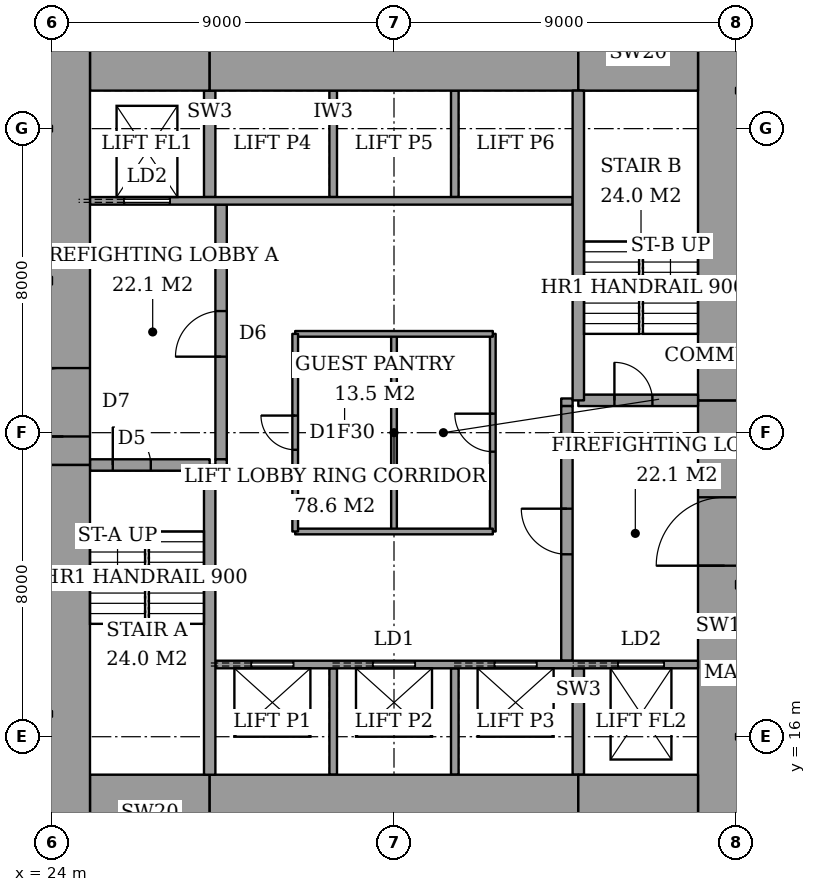
"""IFC4 building model, lengths in metres.
Left out: names, types, materials, properties, quantities, classifications, styles, units other than length and angle.
Written with IfcOpenShell. Run it as: python <this file> out.ifc"""

import sys

from ifc_helpers import new_model, si_unit, direction, frame, frame_2d, origin, place, context, subcontext, project, spatial, rectangle, extrude, element, fill, save


model = new_model("IFC4")
c1 = context("Model", 3, precision=1e-05, world=origin(), true_north=direction((0.0, 1.0)))
c2 = subcontext(c1, "Body", "Model", "MODEL_VIEW")
j1 = project(units=[si_unit("LENGTHUNIT", "METRE"), si_unit("PLANEANGLEUNIT", "RADIAN")], contexts=[c1])
p1 = place(None, origin())
s1 = spatial("IfcSite", under=j1, at=p1, CompositionType="ELEMENT")
p2 = place(p1, origin())
s2 = spatial("IfcBuilding", under=s1, at=p2, CompositionType="ELEMENT")
p3 = place(p2, frame((0.0, 0.0, 83.6)))
s3 = spatial("IfcBuildingStorey", under=s2, at=p3, CompositionType="ELEMENT", Elevation=83.6)
p4 = place(p3, frame((25.0, 14.0, 0.0), z_axis=(0.0, 0.0, 1.0), x_axis=(1.0, 0.0, 0.0)))
e1 = element("IfcWall", 1, at=p4, inside=s3, PredefinedType="SHEAR", context=c2, shape_type="SweptSolid", body=[
    extrude(rectangle(XDim=3.15, YDim=2.0, at=frame_2d((1.575, 0.0))), origin(), (0.0, 0.0, 1.0), 3.6),
])
p5 = place(p3, frame((28.15, 14.0, 0.0), z_axis=(0.0, 0.0, 1.0), x_axis=(1.0, 0.0, 0.0)))
e2 = element("IfcWall", 2, at=p5, inside=s3, PredefinedType="SHEAR", context=c2, shape_type="SweptSolid", body=[
    extrude(rectangle(XDim=9.7, YDim=2.0, at=frame_2d((4.85, 0.0))), origin(), (0.0, 0.0, 1.0), 3.6),
])
for number, where, z_axis, x_axis in (
    (3, (37.85, 14.0, 0.0), (0.0, 0.0, 1.0), (1.0, 0.0, 0.0)),
    (4, (25.0, 34.0, 0.0), (0.0, 0.0, 1.0), (1.0, 0.0, 0.0)),
):
    element("IfcWall", number, at=place(p3, frame(where, z_axis=z_axis, x_axis=x_axis)), inside=s3, PredefinedType="SHEAR", context=c2, shape_type="SweptSolid", body=[
        extrude(rectangle(XDim=3.15, YDim=2.0, at=frame_2d((1.575, 0.0))), origin(), (0.0, 0.0, 1.0), 3.6),
    ])
p6 = place(p3, frame((28.15, 34.0, 0.0), z_axis=(0.0, 0.0, 1.0), x_axis=(1.0, 0.0, 0.0)))
e5 = element("IfcWall", 5, at=p6, inside=s3, PredefinedType="SHEAR", context=c2, shape_type="SweptSolid", body=[
    extrude(rectangle(XDim=9.7, YDim=2.0, at=frame_2d((4.85, 0.0))), origin(), (0.0, 0.0, 1.0), 3.6),
])
p7 = place(p3, frame((37.85, 34.0, 0.0), z_axis=(0.0, 0.0, 1.0), x_axis=(1.0, 0.0, 0.0)))
e6 = element("IfcWall", 6, at=p7, inside=s3, PredefinedType="SHEAR", context=c2, shape_type="SweptSolid", body=[
    extrude(rectangle(XDim=3.15, YDim=2.0, at=frame_2d((1.575, 0.0))), origin(), (0.0, 0.0, 1.0), 3.6),
])
p8 = place(p3, frame((24.3, 13.0, 0.0), z_axis=(0.0, 0.0, 1.0), x_axis=(0.0, 1.0, 0.0)))
e7 = element("IfcWall", 7, at=p8, inside=s3, PredefinedType="SHEAR", context=c2, shape_type="SweptSolid", body=[
    extrude(rectangle(XDim=10.15, YDim=1.4, at=frame_2d((5.075, 0.0))), origin(), (0.0, 0.0, 1.0), 3.6),
])
p9 = place(p3, frame((24.3, 23.15, 0.0), z_axis=(0.0, 0.0, 1.0), x_axis=(0.0, 1.0, 0.0)))
e8 = element("IfcWall", 8, at=p9, inside=s3, PredefinedType="SHEAR", context=c2, shape_type="SweptSolid", body=[
    extrude(rectangle(XDim=11.85, YDim=1.4, at=frame_2d((5.925, 0.0))), origin(), (0.0, 0.0, 1.0), 3.6),
])
p10 = place(p9, frame((0.75, 0.0, 0.0)))
e9 = element("IfcOpeningElement", 9, at=p10, cuts=e8, PredefinedType="OPENING", context=c2, shape_type="SweptSolid", body=[
    extrude(rectangle(XDim=1.8, YDim=2.4, at=frame_2d((0.9, 1.2))), frame((0.0, 0.71, 0.0), z_axis=(0.0, -1.0, 0.0), x_axis=(1.0, 0.0, 0.0)), (0.0, 0.0, 1.0), 1.42),
])
p11 = place(p3, frame((41.7, 13.0, 0.0), z_axis=(0.0, 0.0, 1.0), x_axis=(0.0, 1.0, 0.0)))
e10 = element("IfcWall", 10, at=p11, inside=s3, PredefinedType="SHEAR", context=c2, shape_type="SweptSolid", body=[
    extrude(rectangle(XDim=11.85, YDim=1.4, at=frame_2d((5.925, 0.0))), origin(), (0.0, 0.0, 1.0), 3.6),
])
p12 = place(p11, frame((7.5, 0.0, 0.0)))
e11 = element("IfcOpeningElement", 11, at=p12, cuts=e10, PredefinedType="OPENING", context=c2, shape_type="SweptSolid", body=[
    extrude(rectangle(XDim=1.8, YDim=2.4, at=frame_2d((0.9, 1.2))), frame((0.0, 0.71, 0.0), z_axis=(0.0, -1.0, 0.0), x_axis=(1.0, 0.0, 0.0)), (0.0, 0.0, 1.0), 1.42),
])
p13 = place(p3, frame((41.7, 24.85, 0.0), z_axis=(0.0, 0.0, 1.0), x_axis=(0.0, 1.0, 0.0)))
e12 = element("IfcWall", 12, at=p13, inside=s3, PredefinedType="SHEAR", context=c2, shape_type="SweptSolid", body=[
    extrude(rectangle(XDim=10.15, YDim=1.4, at=frame_2d((5.075, 0.0))), origin(), (0.0, 0.0, 1.0), 3.6),
])
p14 = place(p3, frame((28.15, 15.0, 0.0), z_axis=(0.0, 0.0, 1.0), x_axis=(0.0, 1.0, 0.0)))
e13 = element("IfcWall", 13, at=p14, inside=s3, PredefinedType="SHEAR", context=c2, shape_type="SweptSolid", body=[
    extrude(rectangle(XDim=8.15, YDim=0.3, at=frame_2d((4.075, 0.0))), origin(), (0.0, 0.0, 1.0), 3.6),
])
p15 = place(p3, frame((25.0, 23.15, 0.0), z_axis=(0.0, 0.0, 1.0), x_axis=(1.0, 0.0, 0.0)))
e14 = element("IfcWall", 14, at=p15, inside=s3, PredefinedType="SHEAR", context=c2, shape_type="SweptSolid", body=[
    extrude(rectangle(XDim=3.15, YDim=0.3, at=frame_2d((1.575, 0.0))), origin(), (0.0, 0.0, 1.0), 3.6),
])
p16 = place(p15, frame((0.6, 0.0, 0.0)))
e15 = element("IfcOpeningElement", 15, at=p16, cuts=e14, PredefinedType="OPENING", context=c2, shape_type="SweptSolid", body=[
    extrude(rectangle(XDim=1.0, YDim=2.1, at=frame_2d((0.5, 1.05))), frame((0.0, 0.16, 0.0), z_axis=(0.0, -1.0, 0.0), x_axis=(1.0, 0.0, 0.0)), (0.0, 0.0, 1.0), 0.32),
])
p17 = place(p3, frame((37.85, 24.85, 0.0), z_axis=(0.0, 0.0, 1.0), x_axis=(0.0, 1.0, 0.0)))
e16 = element("IfcWall", 16, at=p17, inside=s3, PredefinedType="SHEAR", context=c2, shape_type="SweptSolid", body=[
    extrude(rectangle(XDim=8.15, YDim=0.3, at=frame_2d((4.075, 0.0))), origin(), (0.0, 0.0, 1.0), 3.6),
])
p18 = place(p3, frame((37.85, 24.85, 0.0), z_axis=(0.0, 0.0, 1.0), x_axis=(1.0, 0.0, 0.0)))
e17 = element("IfcWall", 17, at=p18, inside=s3, PredefinedType="SHEAR", context=c2, shape_type="SweptSolid", body=[
    extrude(rectangle(XDim=3.15, YDim=0.3, at=frame_2d((1.575, 0.0))), origin(), (0.0, 0.0, 1.0), 3.6),
])
p19 = place(p18, frame((0.95, 0.0, 0.0)))
e18 = element("IfcOpeningElement", 18, at=p19, cuts=e17, PredefinedType="OPENING", context=c2, shape_type="SweptSolid", body=[
    extrude(rectangle(XDim=1.0, YDim=2.1, at=frame_2d((0.5, 1.05))), frame((0.0, 0.16, 0.0), z_axis=(0.0, -1.0, 0.0), x_axis=(1.0, 0.0, 0.0)), (0.0, 0.0, 1.0), 0.32),
])
p20 = place(p3, frame((28.45, 23.3, 0.0), z_axis=(0.0, 0.0, 1.0), x_axis=(0.0, 1.0, 0.0)))
e19 = element("IfcWall", 19, at=p20, inside=s3, PredefinedType="PARTITIONING", context=c2, shape_type="SweptSolid", body=[
    extrude(rectangle(XDim=6.7, YDim=0.3, at=frame_2d((3.35, 0.0))), origin(), (0.0, 0.0, 1.0), 3.6),
])
p21 = place(p20, frame((2.7, 0.0, 0.0)))
e20 = element("IfcOpeningElement", 20, at=p21, cuts=e19, PredefinedType="OPENING", context=c2, shape_type="SweptSolid", body=[
    extrude(rectangle(XDim=1.2, YDim=2.1, at=frame_2d((0.6, 1.05))), frame((0.0, 0.16, 0.0), z_axis=(0.0, -1.0, 0.0), x_axis=(1.0, 0.0, 0.0)), (0.0, 0.0, 1.0), 0.32),
])
p22 = place(p3, frame((37.55, 18.0, 0.0), z_axis=(0.0, 0.0, 1.0), x_axis=(0.0, 1.0, 0.0)))
e21 = element("IfcWall", 21, at=p22, inside=s3, PredefinedType="PARTITIONING", context=c2, shape_type="SweptSolid", body=[
    extrude(rectangle(XDim=6.7, YDim=0.3, at=frame_2d((3.35, 0.0))), origin(), (0.0, 0.0, 1.0), 3.6),
])
p23 = place(p22, frame((2.8, 0.0, 0.0)))
e22 = element("IfcOpeningElement", 22, at=p23, cuts=e21, PredefinedType="OPENING", context=c2, shape_type="SweptSolid", body=[
    extrude(rectangle(XDim=1.2, YDim=2.1, at=frame_2d((0.6, 1.05))), frame((0.0, 0.16, 0.0), z_axis=(0.0, -1.0, 0.0), x_axis=(1.0, 0.0, 0.0)), (0.0, 0.0, 1.0), 0.32),
])
p24 = place(p3, frame((28.3, 17.9, 0.0), z_axis=(0.0, 0.0, 1.0), x_axis=(1.0, 0.0, 0.0)))
e23 = element("IfcWall", 23, at=p24, inside=s3, PredefinedType="PARTITIONING", context=c2, shape_type="SweptSolid", body=[
    extrude(rectangle(XDim=12.7, YDim=0.2, at=frame_2d((6.35, 0.0))), origin(), (0.0, 0.0, 1.0), 3.6),
])
p25 = place(p24, frame((0.95, 0.0, 0.0)))
e24 = element("IfcOpeningElement", 24, at=p25, cuts=e23, PredefinedType="OPENING", context=c2, shape_type="SweptSolid", body=[
    extrude(rectangle(XDim=1.1, YDim=2.1, at=frame_2d((0.55, 1.05))), frame((0.0, 0.11, 0.0), z_axis=(0.0, -1.0, 0.0), x_axis=(1.0, 0.0, 0.0)), (0.0, 0.0, 1.0), 0.22),
])
p26 = place(p24, frame((4.15, 0.0, 0.0)))
e25 = element("IfcOpeningElement", 25, at=p26, cuts=e23, PredefinedType="OPENING", context=c2, shape_type="SweptSolid", body=[
    extrude(rectangle(XDim=1.1, YDim=2.1, at=frame_2d((0.55, 1.05))), frame((0.0, 0.11, 0.0), z_axis=(0.0, -1.0, 0.0), x_axis=(1.0, 0.0, 0.0)), (0.0, 0.0, 1.0), 0.22),
])
p27 = place(p24, frame((7.35, 0.0, 0.0)))
e26 = element("IfcOpeningElement", 26, at=p27, cuts=e23, PredefinedType="OPENING", context=c2, shape_type="SweptSolid", body=[
    extrude(rectangle(XDim=1.1, YDim=2.1, at=frame_2d((0.55, 1.05))), frame((0.0, 0.11, 0.0), z_axis=(0.0, -1.0, 0.0), x_axis=(1.0, 0.0, 0.0)), (0.0, 0.0, 1.0), 0.22),
])
p28 = place(p24, frame((10.6, 0.0, 0.0)))
e27 = element("IfcOpeningElement", 27, at=p28, cuts=e23, PredefinedType="OPENING", context=c2, shape_type="SweptSolid", body=[
    extrude(rectangle(XDim=1.2, YDim=2.1, at=frame_2d((0.6, 1.05))), frame((0.0, 0.11, 0.0), z_axis=(0.0, -1.0, 0.0), x_axis=(1.0, 0.0, 0.0)), (0.0, 0.0, 1.0), 0.22),
])
p29 = place(p3, frame((25.0, 30.1, 0.0), z_axis=(0.0, 0.0, 1.0), x_axis=(1.0, 0.0, 0.0)))
e28 = element("IfcWall", 28, at=p29, inside=s3, PredefinedType="PARTITIONING", context=c2, shape_type="SweptSolid", body=[
    extrude(rectangle(XDim=12.7, YDim=0.2, at=frame_2d((6.35, 0.0))), origin(), (0.0, 0.0, 1.0), 3.6),
])
p30 = place(p29, frame((0.9, 0.0, 0.0)))
e29 = element("IfcOpeningElement", 29, at=p30, cuts=e28, PredefinedType="OPENING", context=c2, shape_type="SweptSolid", body=[
    extrude(rectangle(XDim=1.2, YDim=2.1, at=frame_2d((0.6, 1.05))), frame((0.0, 0.11, 0.0), z_axis=(0.0, -1.0, 0.0), x_axis=(1.0, 0.0, 0.0)), (0.0, 0.0, 1.0), 0.22),
])
for number, where, z_axis, x_axis in (
    (30, (31.4, 15.0, 0.0), (0.0, 0.0, 1.0), (0.0, 1.0, 0.0)),
    (31, (34.6, 15.0, 0.0), (0.0, 0.0, 1.0), (0.0, 1.0, 0.0)),
):
    element("IfcWall", number, at=place(p3, frame(where, z_axis=z_axis, x_axis=x_axis)), inside=s3, PredefinedType="PARTITIONING", context=c2, shape_type="SweptSolid", body=[
        extrude(rectangle(XDim=2.8, YDim=0.2, at=frame_2d((1.4, 0.0))), origin(), (0.0, 0.0, 1.0), 3.6),
    ])
p31 = place(p3, frame((37.85, 15.0, 0.0), z_axis=(0.0, 0.0, 1.0), x_axis=(0.0, 1.0, 0.0)))
e32 = element("IfcWall", 32, at=p31, inside=s3, PredefinedType="SHEAR", context=c2, shape_type="SweptSolid", body=[
    extrude(rectangle(XDim=2.8, YDim=0.3, at=frame_2d((1.4, 0.0))), origin(), (0.0, 0.0, 1.0), 3.6),
])
for number, where, z_axis, x_axis in (
    (33, (31.4, 30.2, 0.0), (0.0, 0.0, 1.0), (0.0, 1.0, 0.0)),
    (34, (34.6, 30.2, 0.0), (0.0, 0.0, 1.0), (0.0, 1.0, 0.0)),
):
    element("IfcWall", number, at=place(p3, frame(where, z_axis=z_axis, x_axis=x_axis)), inside=s3, PredefinedType="PARTITIONING", context=c2, shape_type="SweptSolid", body=[
        extrude(rectangle(XDim=2.8, YDim=0.2, at=frame_2d((1.4, 0.0))), origin(), (0.0, 0.0, 1.0), 3.6),
    ])
p32 = place(p3, frame((28.15, 30.2, 0.0), z_axis=(0.0, 0.0, 1.0), x_axis=(0.0, 1.0, 0.0)))
e35 = element("IfcWall", 35, at=p32, inside=s3, PredefinedType="SHEAR", context=c2, shape_type="SweptSolid", body=[
    extrude(rectangle(XDim=2.8, YDim=0.3, at=frame_2d((1.4, 0.0))), origin(), (0.0, 0.0, 1.0), 3.6),
])
for number, where, z_axis, x_axis in (
    (36, (28.3, 23.2, 0.0), (0.0, 0.0, 1.0), (1.0, 0.0, 0.0)),
    (37, (37.4, 24.8, 0.0), (0.0, 0.0, 1.0), (1.0, 0.0, 0.0)),
):
    element("IfcWall", number, at=place(p3, frame(where, z_axis=z_axis, x_axis=x_axis)), inside=s3, PredefinedType="PARTITIONING", context=c2, shape_type="SweptSolid", body=[
        extrude(rectangle(XDim=0.3, YDim=0.2, at=frame_2d((0.15, 0.0))), origin(), (0.0, 0.0, 1.0), 3.6),
    ])
for number, where, z_axis, x_axis in (
    (38, (30.4, 21.4, 0.0), (0.0, 0.0, 1.0), (1.0, 0.0, 0.0)),
    (39, (30.4, 26.6, 0.0), (0.0, 0.0, 1.0), (1.0, 0.0, 0.0)),
):
    element("IfcWall", number, at=place(p3, frame(where, z_axis=z_axis, x_axis=x_axis)), inside=s3, PredefinedType="PARTITIONING", context=c2, shape_type="SweptSolid", body=[
        extrude(rectangle(XDim=5.2, YDim=0.15, at=frame_2d((2.6, 0.0))), origin(), (0.0, 0.0, 1.0), 3.35),
    ])
p33 = place(p3, frame((30.4, 21.4, 0.0), z_axis=(0.0, 0.0, 1.0), x_axis=(0.0, 1.0, 0.0)))
e40 = element("IfcWall", 40, at=p33, inside=s3, PredefinedType="PARTITIONING", context=c2, shape_type="SweptSolid", body=[
    extrude(rectangle(XDim=5.2, YDim=0.15, at=frame_2d((2.6, 0.0))), origin(), (0.0, 0.0, 1.0), 3.35),
])
p34 = place(p33, frame((2.15, 0.0, 0.0)))
e41 = element("IfcOpeningElement", 41, at=p34, cuts=e40, PredefinedType="OPENING", context=c2, shape_type="SweptSolid", body=[
    extrude(rectangle(XDim=0.9, YDim=2.1, at=frame_2d((0.45, 1.05))), frame((0.0, 0.085, 0.0), z_axis=(0.0, -1.0, 0.0), x_axis=(1.0, 0.0, 0.0)), (0.0, 0.0, 1.0), 0.17),
])
p35 = place(p3, frame((35.6, 21.4, 0.0), z_axis=(0.0, 0.0, 1.0), x_axis=(0.0, 1.0, 0.0)))
e42 = element("IfcWall", 42, at=p35, inside=s3, PredefinedType="PARTITIONING", context=c2, shape_type="SweptSolid", body=[
    extrude(rectangle(XDim=5.2, YDim=0.15, at=frame_2d((2.6, 0.0))), origin(), (0.0, 0.0, 1.0), 3.35),
])
p36 = place(p35, frame((2.1, 0.0, 0.0)))
e43 = element("IfcOpeningElement", 43, at=p36, cuts=e42, PredefinedType="OPENING", context=c2, shape_type="SweptSolid", body=[
    extrude(rectangle(XDim=1.0, YDim=2.1, at=frame_2d((0.5, 1.05))), frame((0.0, 0.085, 0.0), z_axis=(0.0, -1.0, 0.0), x_axis=(1.0, 0.0, 0.0)), (0.0, 0.0, 1.0), 0.17),
])
p37 = place(p3, frame((33.0, 21.4, 0.0), z_axis=(0.0, 0.0, 1.0), x_axis=(0.0, 1.0, 0.0)))
e44 = element("IfcWall", 44, at=p37, inside=s3, PredefinedType="PARTITIONING", context=c2, shape_type="SweptSolid", body=[
    extrude(rectangle(XDim=5.2, YDim=0.15, at=frame_2d((2.6, 0.0))), origin(), (0.0, 0.0, 1.0), 3.35),
])
p38 = place(p16, origin())
e45 = element("IfcDoor", 45, at=p38, inside=s3, OperationType="SINGLE_SWING_RIGHT", PredefinedType="DOOR", context=c2, shape_type="SweptSolid", body=[
    extrude(rectangle(XDim=1.0, YDim=2.1, at=frame_2d((0.5, 1.05))), frame((0.0, 0.025, 0.0), z_axis=(0.0, -1.0, 0.0), x_axis=(1.0, 0.0, 0.0)), (0.0, 0.0, 1.0), 0.05),
])
fill(e15, e45)
p39 = place(p19, origin())
e46 = element("IfcDoor", 46, at=p39, inside=s3, OperationType="SINGLE_SWING_RIGHT", PredefinedType="DOOR", context=c2, shape_type="SweptSolid", body=[
    extrude(rectangle(XDim=1.0, YDim=2.1, at=frame_2d((0.5, 1.05))), frame((0.0, 0.025, 0.0), z_axis=(0.0, -1.0, 0.0), x_axis=(1.0, 0.0, 0.0)), (0.0, 0.0, 1.0), 0.05),
])
fill(e18, e46)
p40 = place(p21, origin())
e47 = element("IfcDoor", 47, at=p40, inside=s3, OperationType="SINGLE_SWING_RIGHT", PredefinedType="DOOR", context=c2, shape_type="SweptSolid", body=[
    extrude(rectangle(XDim=1.2, YDim=2.1, at=frame_2d((0.6, 1.05))), frame((0.0, 0.025, 0.0), z_axis=(0.0, -1.0, 0.0), x_axis=(1.0, 0.0, 0.0)), (0.0, 0.0, 1.0), 0.05),
])
fill(e20, e47)
p41 = place(p23, origin())
e48 = element("IfcDoor", 48, at=p41, inside=s3, OperationType="SINGLE_SWING_LEFT", PredefinedType="DOOR", context=c2, shape_type="SweptSolid", body=[
    extrude(rectangle(XDim=1.2, YDim=2.1, at=frame_2d((0.6, 1.05))), frame((0.0, 0.025, 0.0), z_axis=(0.0, -1.0, 0.0), x_axis=(1.0, 0.0, 0.0)), (0.0, 0.0, 1.0), 0.05),
])
fill(e22, e48)
p42 = place(p10, origin())
e49 = element("IfcDoor", 49, at=p42, inside=s3, OperationType="DOUBLE_DOOR_DOUBLE_SWING", PredefinedType="DOOR", context=c2, shape_type="SweptSolid", body=[
    extrude(rectangle(XDim=1.8, YDim=2.4, at=frame_2d((0.9, 1.2))), frame((0.0, 0.025, 0.0), z_axis=(0.0, -1.0, 0.0), x_axis=(1.0, 0.0, 0.0)), (0.0, 0.0, 1.0), 0.05),
])
fill(e9, e49)
p43 = place(p12, origin())
e50 = element("IfcDoor", 50, at=p43, inside=s3, OperationType="DOUBLE_DOOR_DOUBLE_SWING", PredefinedType="DOOR", context=c2, shape_type="SweptSolid", body=[
    extrude(rectangle(XDim=1.8, YDim=2.4, at=frame_2d((0.9, 1.2))), frame((0.0, 0.025, 0.0), z_axis=(0.0, -1.0, 0.0), x_axis=(1.0, 0.0, 0.0)), (0.0, 0.0, 1.0), 0.05),
])
fill(e11, e50)
p44 = place(p34, origin())
e51 = element("IfcDoor", 51, at=p44, inside=s3, OperationType="SINGLE_SWING_LEFT", PredefinedType="DOOR", context=c2, shape_type="SweptSolid", body=[
    extrude(rectangle(XDim=0.9, YDim=2.1, at=frame_2d((0.45, 1.05))), frame((0.0, 0.025, 0.0), z_axis=(0.0, -1.0, 0.0), x_axis=(1.0, 0.0, 0.0)), (0.0, 0.0, 1.0), 0.05),
])
fill(e41, e51)
p45 = place(p36, origin())
e52 = element("IfcDoor", 52, at=p45, inside=s3, OperationType="SINGLE_SWING_LEFT", PredefinedType="DOOR", context=c2, shape_type="SweptSolid", body=[
    extrude(rectangle(XDim=1.0, YDim=2.1, at=frame_2d((0.5, 1.05))), frame((0.0, 0.025, 0.0), z_axis=(0.0, -1.0, 0.0), x_axis=(1.0, 0.0, 0.0)), (0.0, 0.0, 1.0), 0.05),
])
fill(e43, e52)
p46 = place(p25, origin())
e53 = element("IfcDoor", 53, at=p46, inside=s3, OperationType="SLIDING_TO_LEFT", PredefinedType="DOOR", context=c2, shape_type="SweptSolid", body=[
    extrude(rectangle(XDim=1.1, YDim=2.1, at=frame_2d((0.55, 1.05))), frame((0.0, 0.025, 0.0), z_axis=(0.0, -1.0, 0.0), x_axis=(1.0, 0.0, 0.0)), (0.0, 0.0, 1.0), 0.05),
])
fill(e24, e53)
p47 = place(p26, origin())
e54 = element("IfcDoor", 54, at=p47, inside=s3, OperationType="SLIDING_TO_LEFT", PredefinedType="DOOR", context=c2, shape_type="SweptSolid", body=[
    extrude(rectangle(XDim=1.1, YDim=2.1, at=frame_2d((0.55, 1.05))), frame((0.0, 0.025, 0.0), z_axis=(0.0, -1.0, 0.0), x_axis=(1.0, 0.0, 0.0)), (0.0, 0.0, 1.0), 0.05),
])
fill(e25, e54)
p48 = place(p27, origin())
e55 = element("IfcDoor", 55, at=p48, inside=s3, OperationType="SLIDING_TO_LEFT", PredefinedType="DOOR", context=c2, shape_type="SweptSolid", body=[
    extrude(rectangle(XDim=1.1, YDim=2.1, at=frame_2d((0.55, 1.05))), frame((0.0, 0.025, 0.0), z_axis=(0.0, -1.0, 0.0), x_axis=(1.0, 0.0, 0.0)), (0.0, 0.0, 1.0), 0.05),
])
fill(e26, e55)
p49 = place(p30, origin())
e56 = element("IfcDoor", 56, at=p49, inside=s3, OperationType="SLIDING_TO_LEFT", PredefinedType="DOOR", context=c2, shape_type="SweptSolid", body=[
    extrude(rectangle(XDim=1.2, YDim=2.1, at=frame_2d((0.6, 1.05))), frame((0.0, 0.025, 0.0), z_axis=(0.0, -1.0, 0.0), x_axis=(1.0, 0.0, 0.0)), (0.0, 0.0, 1.0), 0.05),
])
fill(e29, e56)
p50 = place(p28, origin())
e57 = element("IfcDoor", 57, at=p50, inside=s3, OperationType="SLIDING_TO_LEFT", PredefinedType="DOOR", context=c2, shape_type="SweptSolid", body=[
    extrude(rectangle(XDim=1.2, YDim=2.1, at=frame_2d((0.6, 1.05))), frame((0.0, 0.025, 0.0), z_axis=(0.0, -1.0, 0.0), x_axis=(1.0, 0.0, 0.0)), (0.0, 0.0, 1.0), 0.05),
])
fill(e27, e57)
save(model, sys.argv[1])
